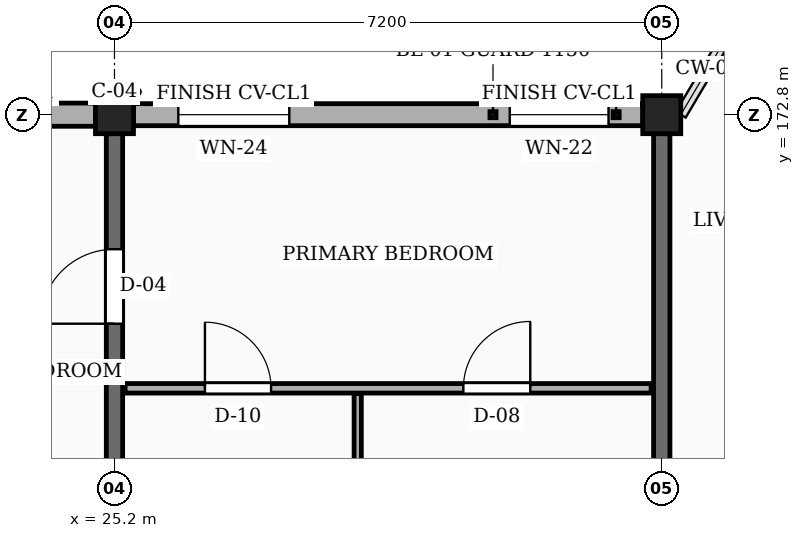
"""IFC4 building model, lengths in metres.
Left out: names, types, materials, properties, quantities, classifications, styles, units other than length and angle.
Written with IfcOpenShell. Run it as: python <this file> out.ifc"""

import sys

from ifc_helpers import new_model, si_unit, direction, frame, frame_2d, origin, origin_2d, place, context, subcontext, project, spatial, rectangle, extrude, element, fill, save


model = new_model("IFC4")
c1 = context("Model", 3, precision=1e-05, world=origin(), true_north=direction((0.0, 1.0)))
c2 = subcontext(c1, "Body", "Model", "MODEL_VIEW")
j1 = project(units=[si_unit("LENGTHUNIT", "METRE"), si_unit("PLANEANGLEUNIT", "RADIAN")], contexts=[c1])
p1 = place(None, origin())
s1 = spatial("IfcSite", under=j1, at=p1, CompositionType="ELEMENT")
p2 = place(p1, origin())
s2 = spatial("IfcBuilding", under=s1, at=p2, CompositionType="ELEMENT")
p3 = place(p2, frame((0.0, 0.0, 26.55)))
s3 = spatial("IfcBuildingStorey", under=s2, at=p3, CompositionType="ELEMENT", Elevation=26.55)
for number, where, z_axis, x_axis in (
    (1, (25.2, 172.8, 0.0), (0.0, 0.0, 1.0), (1.0, 0.0, 0.0)),
    (2, (32.4, 172.8, 0.0), (0.0, 0.0, 1.0), (1.0, 0.0, 0.0)),
):
    element("IfcColumn", number, at=place(p3, frame(where, z_axis=z_axis, x_axis=x_axis)), inside=s3, PredefinedType="COLUMN", context=c2, shape_type="SweptSolid", body=[
        extrude(rectangle(XDim=0.5, YDim=0.5, at=origin_2d()), origin(), (0.0, 0.0, 1.0), 3.15),
    ])
p4 = place(p3, frame((25.2, 165.9, 0.0), z_axis=(0.0, 0.0, 1.0), x_axis=(0.0, 1.0, 0.0)))
e3 = element("IfcWall", 3, at=p4, inside=s3, PredefinedType="SOLIDWALL", context=c2, shape_type="SweptSolid", body=[
    extrude(rectangle(XDim=6.65, YDim=0.215, at=frame_2d((3.325, 0.0))), origin(), (0.0, 0.0, 1.0), 2.185),
])
p5 = place(p4, frame((4.15, 0.0, 0.0)))
e4 = element("IfcOpeningElement", 4, at=p5, cuts=e3, PredefinedType="OPENING", context=c2, shape_type="SweptSolid", body=[
    extrude(rectangle(XDim=0.98, YDim=2.12, at=frame_2d((0.49, 1.06))), frame((0.0, 0.118, 0.0), z_axis=(0.0, -1.0, 0.0), x_axis=(1.0, 0.0, 0.0)), (0.0, 0.0, 1.0), 0.235),
])
p6 = place(p3, frame((32.4, 165.9, 0.0), z_axis=(0.0, 0.0, 1.0), x_axis=(0.0, 1.0, 0.0)))
e5 = element("IfcWall", 5, at=p6, inside=s3, PredefinedType="SOLIDWALL", context=c2, shape_type="SweptSolid", body=[
    extrude(rectangle(XDim=6.65, YDim=0.215, at=frame_2d((3.325, 0.0))), origin(), (0.0, 0.0, 1.0), 2.185),
])
p7 = place(p3, frame((32.15, 172.8, 0.0), z_axis=(0.0, 0.0, 1.0), x_axis=(-1.0, 0.0, 0.0)))
e6 = element("IfcWall", 6, at=p7, inside=s3, PredefinedType="SOLIDWALL", context=c2, shape_type="SweptSolid", body=[
    extrude(rectangle(XDim=6.7, YDim=0.29, at=frame_2d((3.35, 0.0))), origin(), (0.0, 0.0, 1.0), 2.455),
])
p8 = place(p7, frame((0.45, 0.0, 0.78)))
e7 = element("IfcOpeningElement", 7, at=p8, cuts=e6, PredefinedType="OPENING", context=c2, shape_type="SweptSolid", body=[
    extrude(rectangle(XDim=1.3, YDim=1.36, at=frame_2d((0.65, 0.68))), frame((0.0, 0.155, 0.0), z_axis=(0.0, -1.0, 0.0), x_axis=(1.0, 0.0, 0.0)), (0.0, 0.0, 1.0), 0.31),
])
p9 = place(p7, frame((4.65, 0.0, 0.78)))
e8 = element("IfcOpeningElement", 8, at=p9, cuts=e6, PredefinedType="OPENING", context=c2, shape_type="SweptSolid", body=[
    extrude(rectangle(XDim=1.46, YDim=1.36, at=frame_2d((0.73, 0.68))), frame((0.0, 0.155, 0.0), z_axis=(0.0, -1.0, 0.0), x_axis=(1.0, 0.0, 0.0)), (0.0, 0.0, 1.0), 0.31),
])
p10 = place(p3, frame((24.95, 172.8, 0.0), z_axis=(0.0, 0.0, 1.0), x_axis=(-1.0, 0.0, 0.0)))
e9 = element("IfcWall", 9, at=p10, inside=s3, PredefinedType="SOLIDWALL", context=c2, shape_type="SweptSolid", body=[
    extrude(rectangle(XDim=3.93, YDim=0.305, at=frame_2d((1.965, 0.0))), origin(), (0.0, 0.0, 1.0), 2.455),
])
p11 = place(p10, frame((0.81, 0.0, 0.78)))
e10 = element("IfcOpeningElement", 10, at=p11, cuts=e9, PredefinedType="OPENING", context=c2, shape_type="SweptSolid", body=[
    extrude(rectangle(XDim=1.46, YDim=1.36, at=frame_2d((0.73, 0.68))), frame((0.0, 0.163, 0.0), z_axis=(0.0, -1.0, 0.0), x_axis=(1.0, 0.0, 0.0)), (0.0, 0.0, 1.0), 0.325),
])
p12 = place(p3, frame((25.34, 169.2, 0.0), z_axis=(0.0, 0.0, 1.0), x_axis=(1.0, 0.0, 0.0)))
e11 = element("IfcWall", 11, at=p12, inside=s3, PredefinedType="PARTITIONING", context=c2, shape_type="SweptSolid", body=[
    extrude(rectangle(XDim=6.92, YDim=0.125, at=frame_2d((3.46, 0.0))), origin(), (0.0, 0.0, 1.0), 2.32),
])
p13 = place(p12, frame((1.05, 0.0, 0.0)))
e12 = element("IfcOpeningElement", 12, at=p13, cuts=e11, PredefinedType="OPENING", context=c2, shape_type="SweptSolid", body=[
    extrude(rectangle(XDim=0.87, YDim=2.05, at=frame_2d((0.435, 1.025))), frame((0.0, 0.073, 0.0), z_axis=(0.0, -1.0, 0.0), x_axis=(1.0, 0.0, 0.0)), (0.0, 0.0, 1.0), 0.145),
])
p14 = place(p12, frame((4.45, 0.0, 0.0)))
e13 = element("IfcOpeningElement", 13, at=p14, cuts=e11, PredefinedType="OPENING", context=c2, shape_type="SweptSolid", body=[
    extrude(rectangle(XDim=0.88, YDim=2.08, at=frame_2d((0.44, 1.04))), frame((0.0, 0.073, 0.0), z_axis=(0.0, -1.0, 0.0), x_axis=(1.0, 0.0, 0.0)), (0.0, 0.0, 1.0), 0.145),
])
p15 = place(p3, frame((28.4, 165.74, 0.0), z_axis=(0.0, 0.0, 1.0), x_axis=(0.0, 1.0, 0.0)))
e14 = element("IfcWall", 14, at=p15, inside=s3, PredefinedType="PARTITIONING", context=c2, shape_type="SweptSolid", body=[
    extrude(rectangle(XDim=3.39, YDim=0.095, at=frame_2d((1.695, 0.0))), origin(), (0.0, 0.0, 1.0), 2.32),
])
p16 = place(p8, origin())
e15 = element("IfcWindow", 15, at=p16, inside=s3, PartitioningType="SINGLE_PANEL", PredefinedType="WINDOW", context=c2, shape_type="SweptSolid", body=[
    extrude(rectangle(XDim=1.3, YDim=1.36, at=frame_2d((0.65, 0.68))), frame((0.0, 0.03, 0.0), z_axis=(0.0, -1.0, 0.0), x_axis=(1.0, 0.0, 0.0)), (0.0, 0.0, 1.0), 0.06),
])
fill(e7, e15)
p17 = place(p9, origin())
e16 = element("IfcWindow", 16, at=p17, inside=s3, PartitioningType="SINGLE_PANEL", PredefinedType="WINDOW", context=c2, shape_type="SweptSolid", body=[
    extrude(rectangle(XDim=1.46, YDim=1.36, at=frame_2d((0.73, 0.68))), frame((0.0, 0.03, 0.0), z_axis=(0.0, -1.0, 0.0), x_axis=(1.0, 0.0, 0.0)), (0.0, 0.0, 1.0), 0.06),
])
fill(e8, e16)
p18 = place(p13, origin())
e17 = element("IfcDoor", 17, at=p18, inside=s3, OperationType="SINGLE_SWING_LEFT", PredefinedType="DOOR", context=c2, shape_type="SweptSolid", body=[
    extrude(rectangle(XDim=0.87, YDim=2.05, at=frame_2d((0.435, 1.025))), frame((0.0, 0.025, 0.0), z_axis=(0.0, -1.0, 0.0), x_axis=(1.0, 0.0, 0.0)), (0.0, 0.0, 1.0), 0.05),
])
fill(e12, e17)
p19 = place(p14, origin())
e18 = element("IfcDoor", 18, at=p19, inside=s3, OperationType="SINGLE_SWING_RIGHT", PredefinedType="DOOR", context=c2, shape_type="SweptSolid", body=[
    extrude(rectangle(XDim=0.88, YDim=2.08, at=frame_2d((0.44, 1.04))), frame((0.0, 0.025, 0.0), z_axis=(0.0, -1.0, 0.0), x_axis=(1.0, 0.0, 0.0)), (0.0, 0.0, 1.0), 0.05),
])
fill(e13, e18)
p20 = place(p5, origin())
e19 = element("IfcDoor", 19, at=p20, inside=s3, OperationType="SINGLE_SWING_LEFT", PredefinedType="DOOR", context=c2, shape_type="SweptSolid", body=[
    extrude(rectangle(XDim=0.98, YDim=2.12, at=frame_2d((0.49, 1.06))), frame((0.0, 0.025, 0.0), z_axis=(0.0, -1.0, 0.0), x_axis=(1.0, 0.0, 0.0)), (0.0, 0.0, 1.0), 0.05),
])
fill(e4, e19)
save(model, sys.argv[1])
